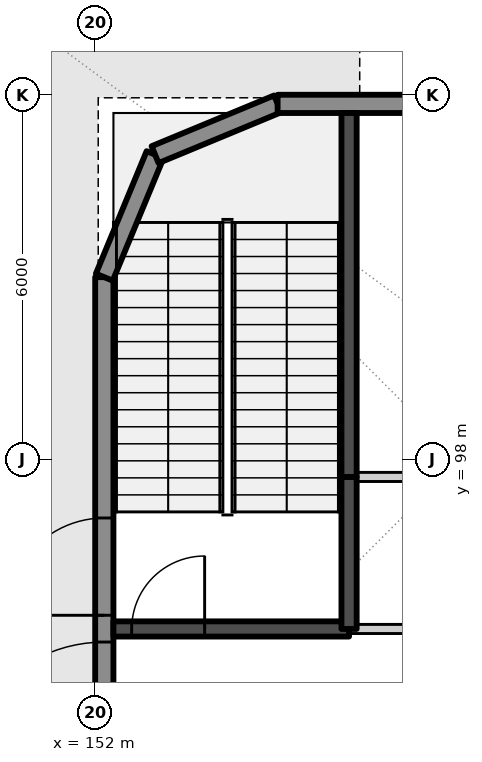
"""IFC4 building model, lengths in metres.
Left out: names, types, materials, properties, quantities, classifications, styles, units other than length and angle.
Written with IfcOpenShell. Run it as: python <this file> out.ifc"""

import sys

from ifc_helpers import new_model, si_unit, direction, frame, frame_2d, origin, place, context, subcontext, project, spatial, rectangle, extrude, element, fill, save


model = new_model("IFC4")
c1 = context("Model", 3, precision=1e-05, world=origin(), true_north=direction((0.0, 1.0)))
c2 = subcontext(c1, "Body", "Model", "MODEL_VIEW")
j1 = project(units=[si_unit("LENGTHUNIT", "METRE"), si_unit("PLANEANGLEUNIT", "RADIAN")], contexts=[c1])
p1 = place(None, origin())
s1 = spatial("IfcSite", under=j1, at=p1, CompositionType="ELEMENT")
p2 = place(p1, origin())
s2 = spatial("IfcBuilding", under=s1, at=p2, CompositionType="ELEMENT")
p3 = place(p2, origin())
s3 = spatial("IfcBuildingStorey", under=s2, at=p3, CompositionType="ELEMENT", Elevation=0.0)
p4 = place(p3, frame((152.15, 92.3, 0.0), z_axis=(0.0, 0.0, 1.0), x_axis=(0.0, 1.0, 0.0)))
e1 = element("IfcWall", 1, at=p4, inside=s3, PredefinedType="SOLIDWALL", context=c2, shape_type="SweptSolid", body=[
    extrude(rectangle(XDim=8.7, YDim=0.3, at=frame_2d((4.35, 0.0))), origin(), (0.0, 0.0, 1.0), 6.6),
])
p5 = place(p4, frame((3.14, 0.0, 0.0)))
e2 = element("IfcOpeningElement", 2, at=p5, cuts=e1, PredefinedType="OPENING", context=c2, shape_type="SweptSolid", body=[
    extrude(rectangle(XDim=1.6, YDim=2.4, at=frame_2d((0.8, 1.2))), frame((0.0, 0.16, 0.0), z_axis=(0.0, -1.0, 0.0), x_axis=(1.0, 0.0, 0.0)), (0.0, 0.0, 1.0), 0.32),
])
p6 = place(p4, frame((0.3, 0.0, 0.0)))
e3 = element("IfcOpeningElement", 3, at=p6, cuts=e1, PredefinedType="OPENING", context=c2, shape_type="SweptSolid", body=[
    extrude(rectangle(XDim=2.4, YDim=2.5, at=frame_2d((1.2, 1.25))), frame((0.0, 0.16, 0.0), z_axis=(0.0, -1.0, 0.0), x_axis=(1.0, 0.0, 0.0)), (0.0, 0.0, 1.0), 0.32),
])
for number, where, z_axis, x_axis in (
    (4, (152.15, 101.0, 0.0), (0.0, 0.0, 1.0), (0.383, 0.924, 0.0)),
    (5, (152.985, 103.015, 0.0), (0.0, 0.0, 1.0), (0.924, 0.383, 0.0)),
):
    element("IfcWall", number, at=place(p3, frame(where, z_axis=z_axis, x_axis=x_axis)), inside=s3, PredefinedType="SOLIDWALL", context=c2, shape_type="SweptSolid", body=[
        extrude(rectangle(XDim=2.181, YDim=0.3, at=frame_2d((1.091, 0.0))), origin(), (0.0, 0.0, 1.0), 6.6),
    ])
p7 = place(p3, frame((155.0, 103.85, 0.0), z_axis=(0.0, 0.0, 1.0), x_axis=(1.0, 0.0, 0.0)))
e6 = element("IfcWall", 6, at=p7, inside=s3, PredefinedType="SOLIDWALL", context=c2, shape_type="SweptSolid", body=[
    extrude(rectangle(XDim=2.7, YDim=0.3, at=frame_2d((1.35, 0.0))), origin(), (0.0, 0.0, 1.0), 6.6),
])
p8 = place(p3, frame((152.3, 95.215, 0.0), z_axis=(0.0, 0.0, 1.0), x_axis=(1.0, 0.0, 0.0)))
e7 = element("IfcWall", 7, at=p8, inside=s3, PredefinedType="SOLIDWALL", context=c2, shape_type="SweptSolid", body=[
    extrude(rectangle(XDim=3.875, YDim=0.25, at=frame_2d((1.938, 0.0))), origin(), (0.0, 0.0, 1.0), 6.6),
])
p9 = place(p8, frame((0.3, 0.0, 0.0)))
e8 = element("IfcOpeningElement", 8, at=p9, cuts=e7, PredefinedType="OPENING", context=c2, shape_type="SweptSolid", body=[
    extrude(rectangle(XDim=1.2, YDim=2.1, at=frame_2d((0.6, 1.05))), frame((0.0, 0.135, 0.0), z_axis=(0.0, -1.0, 0.0), x_axis=(1.0, 0.0, 0.0)), (0.0, 0.0, 1.0), 0.27),
])
p10 = place(p3, frame((156.175, 95.215, 0.0), z_axis=(0.0, 0.0, 1.0), x_axis=(1.0, 0.0, 0.0)))
e9 = element("IfcWall", 9, at=p10, inside=s3, PredefinedType="PARTITIONING", context=c2, shape_type="SweptSolid", body=[
    extrude(rectangle(XDim=13.825, YDim=0.15, at=frame_2d((6.913, 0.0))), origin(), (0.0, 0.0, 1.0), 6.25),
])
p11 = place(p10, frame((6.025, 0.0, 0.0)))
e10 = element("IfcOpeningElement", 10, at=p11, cuts=e9, PredefinedType="OPENING", context=c2, shape_type="SweptSolid", body=[
    extrude(rectangle(XDim=1.6, YDim=2.1, at=frame_2d((0.8, 1.05))), frame((0.0, 0.085, 0.0), z_axis=(0.0, -1.0, 0.0), x_axis=(1.0, 0.0, 0.0)), (0.0, 0.0, 1.0), 0.17),
])
p12 = place(p3, frame((156.175, 97.715, 0.0), z_axis=(0.0, 0.0, 1.0), x_axis=(0.0, -1.0, 0.0)))
e11 = element("IfcWall", 11, at=p12, inside=s3, PredefinedType="SOLIDWALL", context=c2, shape_type="SweptSolid", body=[
    extrude(rectangle(XDim=2.5, YDim=0.25, at=frame_2d((1.25, 0.0))), origin(), (0.0, 0.0, 1.0), 6.6),
])
p13 = place(p3, frame((156.175, 97.715, 0.0), z_axis=(0.0, 0.0, 1.0), x_axis=(1.0, 0.0, 0.0)))
e12 = element("IfcWall", 12, at=p13, inside=s3, PredefinedType="PLUMBINGWALL", context=c2, shape_type="SweptSolid", body=[
    extrude(rectangle(XDim=1.525, YDim=0.15, at=frame_2d((0.762, 0.0))), origin(), (0.0, 0.0, 1.0), 6.25),
])
p14 = place(p3, frame((156.175, 103.7, 0.0), z_axis=(0.0, 0.0, 1.0), x_axis=(0.0, -1.0, 0.0)))
e13 = element("IfcWall", 13, at=p14, inside=s3, PredefinedType="SOLIDWALL", context=c2, shape_type="SweptSolid", body=[
    extrude(rectangle(XDim=5.985, YDim=0.25, at=frame_2d((2.992, 0.0))), origin(), (0.0, 0.0, 1.0), 6.6),
])
p15 = place(p5, origin())
e14 = element("IfcDoor", 14, at=p15, inside=s3, OperationType="SINGLE_SWING_LEFT", PredefinedType="DOOR", context=c2, shape_type="SweptSolid", body=[
    extrude(rectangle(XDim=1.6, YDim=2.4, at=frame_2d((0.8, 1.2))), frame((0.0, 0.025, 0.0), z_axis=(0.0, -1.0, 0.0), x_axis=(1.0, 0.0, 0.0)), (0.0, 0.0, 1.0), 0.05),
])
fill(e2, e14)
p16 = place(p6, origin())
e15 = element("IfcDoor", 15, at=p16, inside=s3, OperationType="SINGLE_SWING_LEFT", PredefinedType="DOOR", context=c2, shape_type="SweptSolid", body=[
    extrude(rectangle(XDim=2.4, YDim=2.5, at=frame_2d((1.2, 1.25))), frame((0.0, 0.025, 0.0), z_axis=(0.0, -1.0, 0.0), x_axis=(1.0, 0.0, 0.0)), (0.0, 0.0, 1.0), 0.05),
])
fill(e3, e15)
p17 = place(p9, origin())
e16 = element("IfcDoor", 16, at=p17, inside=s3, OperationType="SINGLE_SWING_RIGHT", PredefinedType="DOOR", context=c2, shape_type="SweptSolid", body=[
    extrude(rectangle(XDim=1.2, YDim=2.1, at=frame_2d((0.6, 1.05))), frame((0.0, 0.025, 0.0), z_axis=(0.0, -1.0, 0.0), x_axis=(1.0, 0.0, 0.0)), (0.0, 0.0, 1.0), 0.05),
])
fill(e8, e16)
save(model, sys.argv[1])
